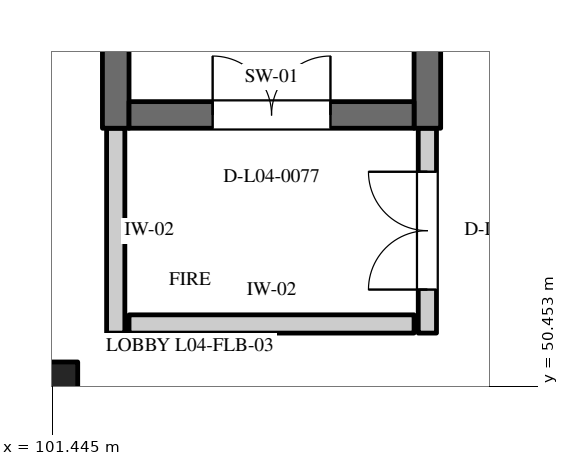
"""IFC4 building model, lengths in metres.
Left out: names, types, materials, properties, quantities, classifications, styles, units other than length and angle.
Written with IfcOpenShell. Run it as: python <this file> out.ifc"""

import sys

from ifc_helpers import new_model, si_unit, direction, frame, frame_2d, origin, origin_2d, place, context, subcontext, project, spatial, rectangle, extrude, element, fill, save


model = new_model("IFC4")
c1 = context("Model", 3, precision=1e-05, world=origin(), true_north=direction((0.0, 1.0)))
c2 = subcontext(c1, "Body", "Model", "MODEL_VIEW")
j1 = project(units=[si_unit("LENGTHUNIT", "METRE"), si_unit("PLANEANGLEUNIT", "RADIAN")], contexts=[c1])
p1 = place(None, origin())
s1 = spatial("IfcSite", under=j1, at=p1, CompositionType="ELEMENT")
p2 = place(p1, origin())
s2 = spatial("IfcBuilding", under=s1, at=p2, CompositionType="ELEMENT")
p3 = place(p2, frame((0.0, 0.0, 18.0)))
s3 = spatial("IfcBuildingStorey", under=s2, at=p3, CompositionType="ELEMENT", Elevation=18.0)
p4 = place(p3, frame((101.4, 50.4, 0.0), z_axis=(0.0, 0.0, 1.0), x_axis=(1.0, 0.0, 0.0)))
e1 = element("IfcColumn", 1, at=p4, inside=s3, PredefinedType="COLUMN", context=c2, shape_type="SweptSolid", body=[
    extrude(rectangle(XDim=0.75, YDim=0.75, at=origin_2d()), origin(), (0.0, 0.0, 1.0), 4.2),
])
for number, where, z_axis, x_axis in (
    (2, (102.275, 53.85, 0.0), (0.0, 0.0, 1.0), (0.0, 1.0, 0.0)),
    (3, (106.375, 53.85, 0.0), (0.0, 0.0, 1.0), (0.0, 1.0, 0.0)),
):
    element("IfcWall", number, at=place(p3, frame(where, z_axis=z_axis, x_axis=x_axis)), inside=s3, PredefinedType="SHEAR", context=c2, shape_type="SweptSolid", body=[
        extrude(rectangle(XDim=10.5, YDim=0.35, at=frame_2d((5.25, 0.0))), origin(), (0.0, 0.0, 1.0), 4.2),
    ])
p5 = place(p3, frame((102.45, 54.025, 0.0), z_axis=(0.0, 0.0, 1.0), x_axis=(1.0, 0.0, 0.0)))
e4 = element("IfcWall", 4, at=p5, inside=s3, PredefinedType="SHEAR", context=c2, shape_type="SweptSolid", body=[
    extrude(rectangle(XDim=3.75, YDim=0.35, at=frame_2d((1.875, 0.0))), origin(), (0.0, 0.0, 1.0), 3.885),
])
p6 = place(p5, frame((1.1, 0.0, 0.0)))
e5 = element("IfcOpeningElement", 5, at=p6, cuts=e4, PredefinedType="OPENING", context=c2, shape_type="SweptSolid", body=[
    extrude(rectangle(XDim=1.55, YDim=2.25, at=frame_2d((0.775, 1.125))), frame((0.0, 0.187, 0.0), z_axis=(0.0, -1.0, 0.0), x_axis=(1.0, 0.0, 0.0)), (0.0, 0.0, 1.0), 0.374),
])
p7 = place(p3, frame((102.275, 51.155, 0.0), z_axis=(0.0, 0.0, 1.0), x_axis=(0.0, 1.0, 0.0)))
e6 = element("IfcWall", 6, at=p7, inside=s3, PredefinedType="STANDARD", context=c2, shape_type="SweptSolid", body=[
    extrude(rectangle(XDim=2.695, YDim=0.24, at=frame_2d((1.348, 0.0))), origin(), (0.0, 0.0, 1.0), 3.885),
])
p8 = place(p3, frame((106.375, 51.155, 0.0), z_axis=(0.0, 0.0, 1.0), x_axis=(0.0, 1.0, 0.0)))
e7 = element("IfcWall", 7, at=p8, inside=s3, PredefinedType="STANDARD", context=c2, shape_type="SweptSolid", body=[
    extrude(rectangle(XDim=2.695, YDim=0.24, at=frame_2d((1.348, 0.0))), origin(), (0.0, 0.0, 1.0), 3.885),
])
p9 = place(p8, frame((0.573, 0.0, 0.0)))
e8 = element("IfcOpeningElement", 8, at=p9, cuts=e7, PredefinedType="OPENING", context=c2, shape_type="SweptSolid", body=[
    extrude(rectangle(XDim=1.55, YDim=2.25, at=frame_2d((0.775, 1.125))), frame((0.0, 0.132, 0.0), z_axis=(0.0, -1.0, 0.0), x_axis=(1.0, 0.0, 0.0)), (0.0, 0.0, 1.0), 0.264),
])
p10 = place(p3, frame((102.45, 51.275, 0.0), z_axis=(0.0, 0.0, 1.0), x_axis=(1.0, 0.0, 0.0)))
e9 = element("IfcWall", 9, at=p10, inside=s3, PredefinedType="STANDARD", context=c2, shape_type="SweptSolid", body=[
    extrude(rectangle(XDim=3.75, YDim=0.24, at=frame_2d((1.875, 0.0))), origin(), (0.0, 0.0, 1.0), 3.885),
])
p11 = place(p6, origin())
e10 = element("IfcDoor", 10, at=p11, inside=s3, OperationType="DOUBLE_DOOR_SINGLE_SWING", PredefinedType="DOOR", context=c2, shape_type="SweptSolid", body=[
    extrude(rectangle(XDim=1.55, YDim=2.25, at=frame_2d((0.775, 1.125))), frame((0.0, 0.025, 0.0), z_axis=(0.0, -1.0, 0.0), x_axis=(1.0, 0.0, 0.0)), (0.0, 0.0, 1.0), 0.05),
])
fill(e5, e10)
p12 = place(p9, origin())
e11 = element("IfcDoor", 11, at=p12, inside=s3, OperationType="DOUBLE_DOOR_SINGLE_SWING", PredefinedType="DOOR", context=c2, shape_type="SweptSolid", body=[
    extrude(rectangle(XDim=1.55, YDim=2.25, at=frame_2d((0.775, 1.125))), frame((0.0, 0.025, 0.0), z_axis=(0.0, -1.0, 0.0), x_axis=(1.0, 0.0, 0.0)), (0.0, 0.0, 1.0), 0.05),
])
fill(e8, e11)
save(model, sys.argv[1])
